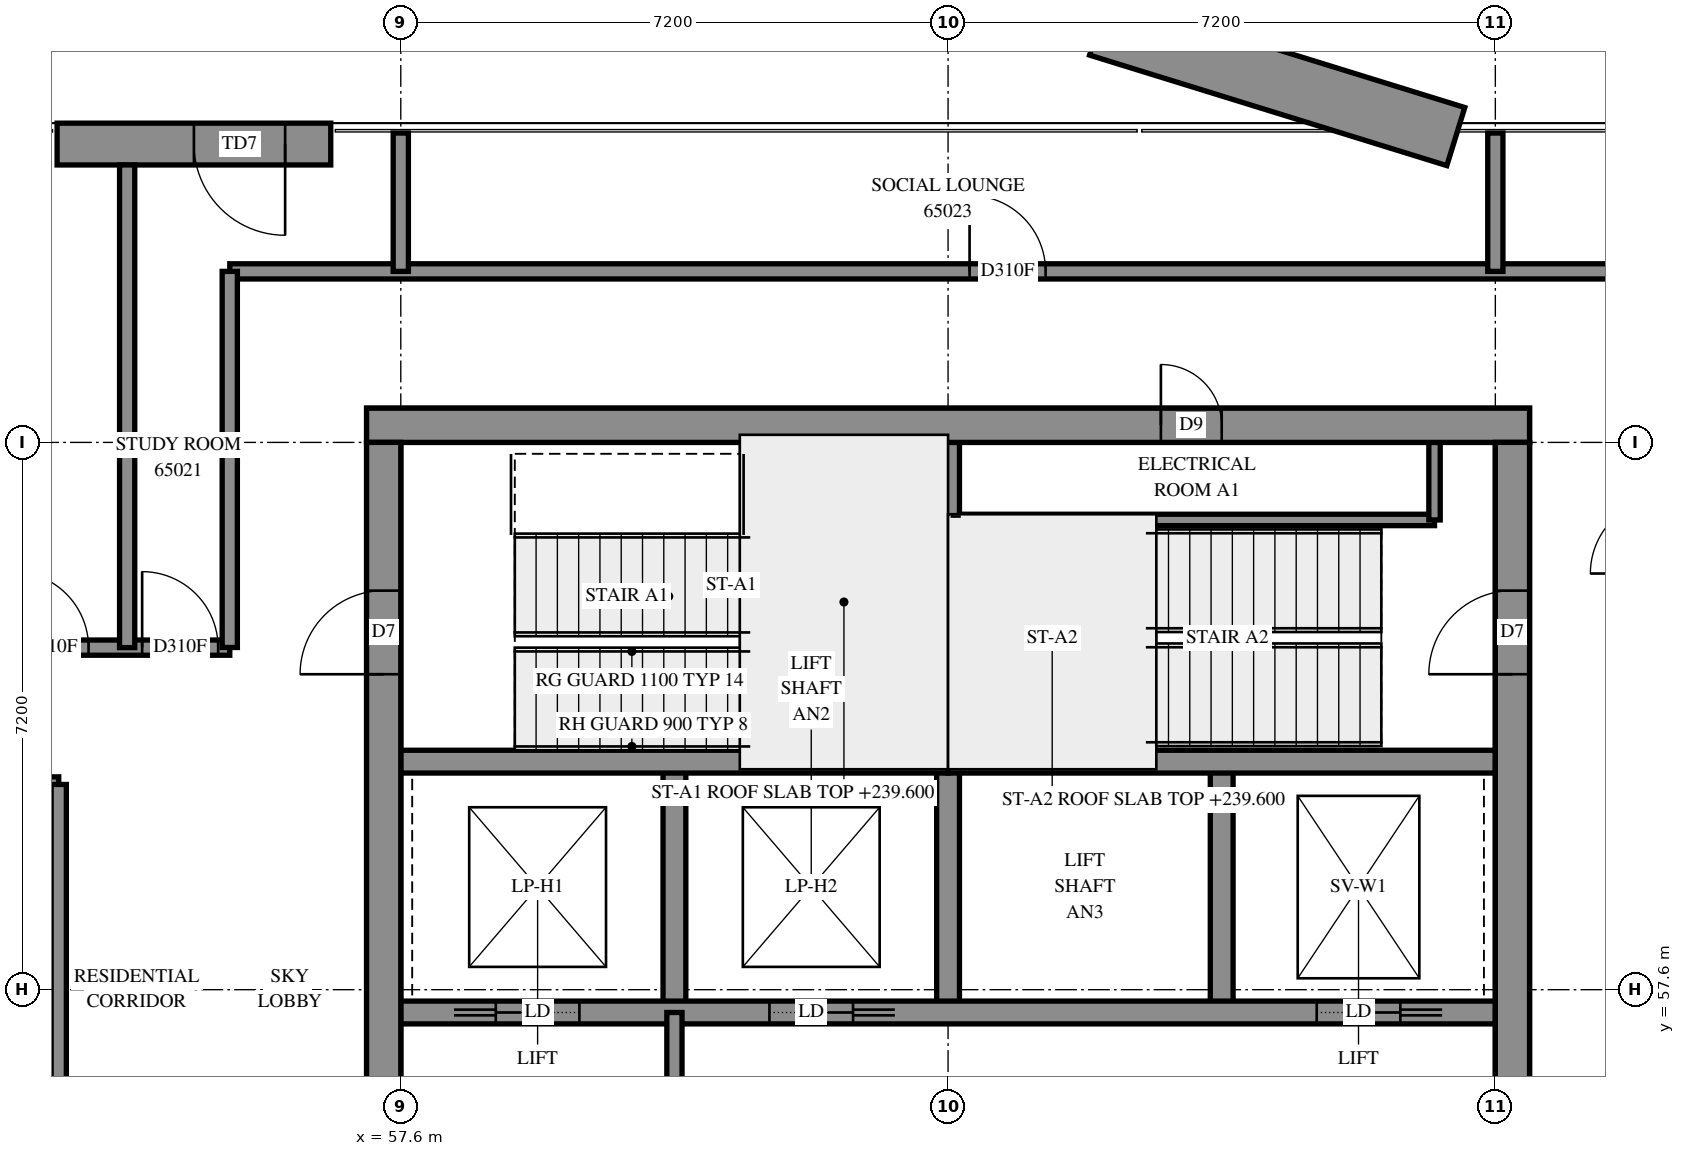
"""IFC4 building model, lengths in metres.
Left out: names, types, materials, properties, quantities, classifications, styles, units other than length and angle.
Written with IfcOpenShell. Run it as: python <this file> out.ifc"""

import sys

from ifc_helpers import new_model, si_unit, direction, frame, frame_2d, origin, place, context, subcontext, project, spatial, rectangle, extrude, element, fill, save


model = new_model("IFC4")
c1 = context("Model", 3, precision=1e-05, world=origin(), true_north=direction((0.0, 1.0)))
c2 = subcontext(c1, "Body", "Model", "MODEL_VIEW")
j1 = project(units=[si_unit("LENGTHUNIT", "METRE"), si_unit("PLANEANGLEUNIT", "RADIAN")], contexts=[c1])
p1 = place(None, origin())
s1 = spatial("IfcSite", under=j1, at=p1, CompositionType="ELEMENT")
p2 = place(p1, origin())
s2 = spatial("IfcBuilding", under=s1, at=p2, CompositionType="ELEMENT")
p3 = place(p2, frame((0.0, 0.0, 239.6)))
s3 = spatial("IfcBuildingStorey", under=s2, at=p3, CompositionType="ELEMENT", Elevation=239.6)
p4 = place(p3, frame((57.15, 65.025, -0.3), z_axis=(0.0, 0.0, 1.0), x_axis=(1.0, 0.0, 0.0)))
e1 = element("IfcWall", 1, at=p4, inside=s3, PredefinedType="SHEAR", context=c2, shape_type="SweptSolid", body=[
    extrude(rectangle(XDim=15.3, YDim=0.45, at=frame_2d((7.65, 0.0))), origin(), (0.0, 0.0, 1.0), 3.5),
])
p5 = place(p4, frame((10.45, 0.0, 0.3)))
e2 = element("IfcOpeningElement", 2, at=p5, cuts=e1, PredefinedType="OPENING", context=c2, shape_type="SweptSolid", body=[
    extrude(rectangle(XDim=0.8, YDim=2.1, at=frame_2d((0.4, 1.05))), frame((0.0, 0.235, 0.0), z_axis=(0.0, -1.0, 0.0), x_axis=(1.0, 0.0, 0.0)), (0.0, 0.0, 1.0), 0.47),
])
p6 = place(p3, frame((57.375, 50.4, -0.3), z_axis=(0.0, 0.0, 1.0), x_axis=(0.0, 1.0, 0.0)))
e3 = element("IfcWall", 3, at=p6, inside=s3, PredefinedType="SHEAR", context=c2, shape_type="SweptSolid", body=[
    extrude(rectangle(XDim=14.4, YDim=0.45, at=frame_2d((7.2, 0.0))), origin(), (0.0, 0.0, 1.0), 3.5),
])
p7 = place(p6, frame((4.55, 0.0, 0.3)))
e4 = element("IfcOpeningElement", 4, at=p7, cuts=e3, PredefinedType="OPENING", context=c2, shape_type="SweptSolid", body=[
    extrude(rectangle(XDim=1.1, YDim=2.1, at=frame_2d((0.55, 1.05))), frame((0.0, 0.235, 0.0), z_axis=(0.0, -1.0, 0.0), x_axis=(1.0, 0.0, 0.0)), (0.0, 0.0, 1.0), 0.47),
])
p8 = place(p6, frame((11.35, 0.0, 0.3)))
e5 = element("IfcOpeningElement", 5, at=p8, cuts=e3, PredefinedType="OPENING", context=c2, shape_type="SweptSolid", body=[
    extrude(rectangle(XDim=1.1, YDim=2.1, at=frame_2d((0.55, 1.05))), frame((0.0, 0.235, 0.0), z_axis=(0.0, -1.0, 0.0), x_axis=(1.0, 0.0, 0.0)), (0.0, 0.0, 1.0), 0.47),
])
p9 = place(p3, frame((72.225, 50.4, -0.3), z_axis=(0.0, 0.0, 1.0), x_axis=(0.0, 1.0, 0.0)))
e6 = element("IfcWall", 6, at=p9, inside=s3, PredefinedType="SHEAR", context=c2, shape_type="SweptSolid", body=[
    extrude(rectangle(XDim=14.4, YDim=0.45, at=frame_2d((7.2, 0.0))), origin(), (0.0, 0.0, 1.0), 3.5),
])
p10 = place(p9, frame((4.55, 0.0, 0.3)))
e7 = element("IfcOpeningElement", 7, at=p10, cuts=e6, PredefinedType="OPENING", context=c2, shape_type="SweptSolid", body=[
    extrude(rectangle(XDim=1.1, YDim=2.1, at=frame_2d((0.55, 1.05))), frame((0.0, 0.235, 0.0), z_axis=(0.0, -1.0, 0.0), x_axis=(1.0, 0.0, 0.0)), (0.0, 0.0, 1.0), 0.47),
])
p11 = place(p9, frame((11.35, 0.0, 0.3)))
e8 = element("IfcOpeningElement", 8, at=p11, cuts=e6, PredefinedType="OPENING", context=c2, shape_type="SweptSolid", body=[
    extrude(rectangle(XDim=1.1, YDim=2.1, at=frame_2d((0.55, 1.05))), frame((0.0, 0.235, 0.0), z_axis=(0.0, -1.0, 0.0), x_axis=(1.0, 0.0, 0.0)), (0.0, 0.0, 1.0), 0.47),
])
for number, where, z_axis, x_axis in (
    (9, (61.2, 57.3, 0.0), (0.0, 0.0, 1.0), (0.0, 1.0, 0.0)),
    (10, (64.8, 57.3, 0.0), (0.0, 0.0, 1.0), (0.0, 1.0, 0.0)),
    (11, (68.4, 57.3, 0.0), (0.0, 0.0, 1.0), (0.0, 1.0, 0.0)),
):
    element("IfcWall", number, at=place(p3, frame(where, z_axis=z_axis, x_axis=x_axis)), inside=s3, PredefinedType="SOLIDWALL", context=c2, shape_type="SweptSolid", body=[
        extrude(rectangle(XDim=3.3, YDim=0.3, at=frame_2d((1.65, 0.0))), origin(), (0.0, 0.0, 1.0), 3.9),
    ])
p12 = place(p3, frame((57.6, 57.3, 0.0), z_axis=(0.0, 0.0, 1.0), x_axis=(1.0, 0.0, 0.0)))
e12 = element("IfcWall", 12, at=p12, inside=s3, PredefinedType="SOLIDWALL", context=c2, shape_type="SweptSolid", body=[
    extrude(rectangle(XDim=14.4, YDim=0.3, at=frame_2d((7.2, 0.0))), origin(), (0.0, 0.0, 1.0), 3.9),
])
p13 = place(p12, frame((1.25, 0.0, 0.0)))
e13 = element("IfcOpeningElement", 13, at=p13, cuts=e12, PredefinedType="OPENING", context=c2, shape_type="SweptSolid", body=[
    extrude(rectangle(XDim=1.1, YDim=2.1, at=frame_2d((0.55, 1.05))), frame((0.0, 0.16, 0.0), z_axis=(0.0, -1.0, 0.0), x_axis=(1.0, 0.0, 0.0)), (0.0, 0.0, 1.0), 0.32),
])
p14 = place(p12, frame((4.85, 0.0, 0.0)))
e14 = element("IfcOpeningElement", 14, at=p14, cuts=e12, PredefinedType="OPENING", context=c2, shape_type="SweptSolid", body=[
    extrude(rectangle(XDim=1.1, YDim=2.1, at=frame_2d((0.55, 1.05))), frame((0.0, 0.16, 0.0), z_axis=(0.0, -1.0, 0.0), x_axis=(1.0, 0.0, 0.0)), (0.0, 0.0, 1.0), 0.32),
])
p15 = place(p12, frame((12.05, 0.0, 0.0)))
e15 = element("IfcOpeningElement", 15, at=p15, cuts=e12, PredefinedType="OPENING", context=c2, shape_type="SweptSolid", body=[
    extrude(rectangle(XDim=1.1, YDim=2.1, at=frame_2d((0.55, 1.05))), frame((0.0, 0.16, 0.0), z_axis=(0.0, -1.0, 0.0), x_axis=(1.0, 0.0, 0.0)), (0.0, 0.0, 1.0), 0.32),
])
for number, where, z_axis, x_axis in (
    (16, (57.6, 60.6, 0.0), (0.0, 0.0, 1.0), (1.0, 0.0, 0.0)),
    (17, (64.8, 60.6, 0.0), (0.0, 0.0, 1.0), (1.0, 0.0, 0.0)),
):
    element("IfcWall", number, at=place(p3, frame(where, z_axis=z_axis, x_axis=x_axis)), inside=s3, PredefinedType="SOLIDWALL", context=c2, shape_type="SweptSolid", body=[
        extrude(rectangle(XDim=7.2, YDim=0.3, at=frame_2d((3.6, 0.0))), origin(), (0.0, 0.0, 1.0), 3.9),
    ])
p16 = place(p3, frame((64.8, 60.6, 0.0), z_axis=(0.0, 0.0, 1.0), x_axis=(0.0, 1.0, 0.0)))
e18 = element("IfcWall", 18, at=p16, inside=s3, PredefinedType="SOLIDWALL", context=c2, shape_type="SweptSolid", body=[
    extrude(rectangle(XDim=4.2, YDim=0.3, at=frame_2d((2.1, 0.0))), origin(), (0.0, 0.0, 1.0), 3.9),
])
p17 = place(p3, frame((56.678, 68.725, 0.0), z_axis=(0.0, 0.0, 1.0), x_axis=(-1.0, 0.0, 0.0)))
e19 = element("IfcWall", 19, at=p17, inside=s3, PredefinedType="SOLIDWALL", context=c2, shape_type="SweptSolid", body=[
    extrude(rectangle(XDim=3.6, YDim=0.55, at=frame_2d((1.8, 0.0))), origin(), (0.0, 0.0, 1.0), 3.9),
])
p18 = place(p17, frame((0.6, 0.0, 0.0)))
e20 = element("IfcOpeningElement", 20, at=p18, cuts=e19, PredefinedType="OPENING", context=c2, shape_type="SweptSolid", body=[
    extrude(rectangle(XDim=1.2, YDim=2.4, at=frame_2d((0.6, 1.2))), frame((0.0, 0.285, 0.0), z_axis=(0.0, -1.0, 0.0), x_axis=(1.0, 0.0, 0.0)), (0.0, 0.0, 1.0), 0.57),
])
p19 = place(p3, frame((71.48, 68.824, 0.0), z_axis=(0.0, 0.0, 1.0), x_axis=(-0.9553587294, 0.2954483004, 0.0)))
e21 = element("IfcWall", 21, at=p19, inside=s3, PredefinedType="SOLIDWALL", context=c2, shape_type="SweptSolid", body=[
    extrude(rectangle(XDim=4.919, YDim=0.8, at=frame_2d((2.46, 0.0))), origin(), (0.0, 0.0, 1.0), 0.65),
])
p20 = place(p3, frame((64.95, 63.78, 0.0), z_axis=(0.0, 0.0, 1.0), x_axis=(1.0, 0.0, 0.0)))
e22 = element("IfcWall", 22, at=p20, inside=s3, PredefinedType="PARTITIONING", context=c2, shape_type="SweptSolid", body=[
    extrude(rectangle(XDim=6.25, YDim=0.15, at=frame_2d((3.125, 0.0))), origin(), (0.0, 0.0, 1.0), 3.9),
])
p21 = place(p3, frame((71.2, 63.78, 0.0), z_axis=(0.0, 0.0, 1.0), x_axis=(0.0, 1.0, 0.0)))
e23 = element("IfcWall", 23, at=p21, inside=s3, PredefinedType="PARTITIONING", context=c2, shape_type="SweptSolid", body=[
    extrude(rectangle(XDim=1.02, YDim=0.15, at=frame_2d((0.51, 0.0))), origin(), (0.0, 0.0, 1.0), 3.9),
])
p22 = place(p3, frame((61.2, 53.7, 0.0), z_axis=(0.0, 0.0, 1.0), x_axis=(0.0, 1.0, 0.0)))
e24 = element("IfcWall", 24, at=p22, inside=s3, PredefinedType="PARTITIONING", context=c2, shape_type="SweptSolid", body=[
    extrude(rectangle(XDim=3.6, YDim=0.2, at=frame_2d((1.8, 0.0))), origin(), (0.0, 0.0, 1.0), 3.9),
])
p23 = place(p3, frame((55.35, 67.05, 0.0), z_axis=(0.0, 0.0, 1.0), x_axis=(1.0, 0.0, 0.0)))
e25 = element("IfcWall", 25, at=p23, inside=s3, PredefinedType="PARTITIONING", context=c2, shape_type="SweptSolid", body=[
    extrude(rectangle(XDim=18.9, YDim=0.2, at=frame_2d((9.45, 0.0))), origin(), (0.0, 0.0, 1.0), 3.9),
])
p24 = place(p23, frame((9.733, 0.0, 0.0)))
e26 = element("IfcOpeningElement", 26, at=p24, cuts=e25, PredefinedType="OPENING", context=c2, shape_type="SweptSolid", body=[
    extrude(rectangle(XDim=1.0, YDim=2.1, at=frame_2d((0.5, 1.05))), frame((0.0, 0.11, 0.0), z_axis=(0.0, -1.0, 0.0), x_axis=(1.0, 0.0, 0.0)), (0.0, 0.0, 1.0), 0.22),
])
p25 = place(p3, frame((40.502, 62.1, 0.0), z_axis=(0.0, 0.0, 1.0), x_axis=(1.0, 0.0, 0.0)))
e27 = element("IfcWall", 27, at=p25, inside=s3, PredefinedType="PARTITIONING", context=c2, shape_type="SweptSolid", body=[
    extrude(rectangle(XDim=14.848, YDim=0.2, at=frame_2d((7.424, 0.0))), origin(), (0.0, 0.0, 1.0), 3.9),
])
p26 = place(p25, frame((6.561, 0.0, 0.0)))
e28 = element("IfcOpeningElement", 28, at=p26, cuts=e27, PredefinedType="OPENING", context=c2, shape_type="SweptSolid", body=[
    extrude(rectangle(XDim=1.0, YDim=2.1, at=frame_2d((0.5, 1.05))), frame((0.0, 0.11, 0.0), z_axis=(0.0, -1.0, 0.0), x_axis=(1.0, 0.0, 0.0)), (0.0, 0.0, 1.0), 0.22),
])
p27 = place(p25, frame((11.991, 0.0, 0.0)))
e29 = element("IfcOpeningElement", 29, at=p27, cuts=e27, PredefinedType="OPENING", context=c2, shape_type="SweptSolid", body=[
    extrude(rectangle(XDim=1.0, YDim=2.1, at=frame_2d((0.5, 1.05))), frame((0.0, 0.11, 0.0), z_axis=(0.0, -1.0, 0.0), x_axis=(1.0, 0.0, 0.0)), (0.0, 0.0, 1.0), 0.22),
])
p28 = place(p25, frame((13.695, 0.0, 0.0)))
e30 = element("IfcOpeningElement", 30, at=p28, cuts=e27, PredefinedType="OPENING", context=c2, shape_type="SweptSolid", body=[
    extrude(rectangle(XDim=1.0, YDim=2.1, at=frame_2d((0.5, 1.05))), frame((0.0, 0.11, 0.0), z_axis=(0.0, -1.0, 0.0), x_axis=(1.0, 0.0, 0.0)), (0.0, 0.0, 1.0), 0.22),
])
p29 = place(p3, frame((46.33, 60.3, 0.0), z_axis=(0.0, 0.0, 1.0), x_axis=(1.0, 0.0, 0.0)))
e31 = element("IfcWall", 31, at=p29, inside=s3, PredefinedType="PARTITIONING", context=c2, shape_type="SweptSolid", body=[
    extrude(rectangle(XDim=6.77, YDim=0.2, at=frame_2d((3.385, 0.0))), origin(), (0.0, 0.0, 1.0), 3.9),
])
p30 = place(p29, frame((0.924, 0.0, 0.0)))
e32 = element("IfcOpeningElement", 32, at=p30, cuts=e31, PredefinedType="OPENING", context=c2, shape_type="SweptSolid", body=[
    extrude(rectangle(XDim=1.0, YDim=2.1, at=frame_2d((0.5, 1.05))), frame((0.0, 0.11, 0.0), z_axis=(0.0, -1.0, 0.0), x_axis=(1.0, 0.0, 0.0)), (0.0, 0.0, 1.0), 0.22),
])
p31 = place(p29, frame((5.633, 0.0, 0.0)))
e33 = element("IfcOpeningElement", 33, at=p31, cuts=e31, PredefinedType="OPENING", context=c2, shape_type="SweptSolid", body=[
    extrude(rectangle(XDim=1.0, YDim=2.1, at=frame_2d((0.5, 1.05))), frame((0.0, 0.11, 0.0), z_axis=(0.0, -1.0, 0.0), x_axis=(1.0, 0.0, 0.0)), (0.0, 0.0, 1.0), 0.22),
])
p32 = place(p3, frame((54.0, 62.1, 0.0), z_axis=(0.0, 0.0, 1.0), x_axis=(0.0, 1.0, 0.0)))
e34 = element("IfcWall", 34, at=p32, inside=s3, PredefinedType="PARTITIONING", context=c2, shape_type="SweptSolid", body=[
    extrude(rectangle(XDim=6.35, YDim=0.2, at=frame_2d((3.175, 0.0))), origin(), (0.0, 0.0, 1.0), 3.9),
])
p33 = place(p3, frame((53.1, 54.902, 0.0), z_axis=(0.0, 0.0, 1.0), x_axis=(0.0, 1.0, 0.0)))
e35 = element("IfcWall", 35, at=p33, inside=s3, PredefinedType="PARTITIONING", context=c2, shape_type="SweptSolid", body=[
    extrude(rectangle(XDim=5.398, YDim=0.2, at=frame_2d((2.699, 0.0))), origin(), (0.0, 0.0, 1.0), 3.9),
])
p34 = place(p3, frame((55.35, 62.102, 0.0), z_axis=(0.0, 0.0, 1.0), x_axis=(0.0, 1.0, 0.0)))
e36 = element("IfcWall", 36, at=p34, inside=s3, PredefinedType="PARTITIONING", context=c2, shape_type="SweptSolid", body=[
    extrude(rectangle(XDim=4.948, YDim=0.2, at=frame_2d((2.474, 0.0))), origin(), (0.0, 0.0, 1.0), 3.9),
])
for number, where, z_axis, x_axis in (
    (37, (57.6, 67.05, 0.0), (0.0, 0.0, 1.0), (0.0, 1.0, 0.0)),
    (38, (72.0, 67.05, 0.0), (0.0, 0.0, 1.0), (0.0, 1.0, 0.0)),
):
    element("IfcWall", number, at=place(p3, frame(where, z_axis=z_axis, x_axis=x_axis)), inside=s3, PredefinedType="PARTITIONING", context=c2, shape_type="SweptSolid", body=[
        extrude(rectangle(XDim=1.82, YDim=0.2, at=frame_2d((0.91, 0.0))), origin(), (0.0, 0.0, 1.0), 3.9),
    ])
p35 = place(p18, origin())
e39 = element("IfcDoor", 39, at=p35, inside=s3, OperationType="SINGLE_SWING_LEFT", PredefinedType="DOOR", context=c2, shape_type="SweptSolid", body=[
    extrude(rectangle(XDim=1.2, YDim=2.4, at=frame_2d((0.6, 1.2))), frame((0.0, 0.025, 0.0), z_axis=(0.0, -1.0, 0.0), x_axis=(1.0, 0.0, 0.0)), (0.0, 0.0, 1.0), 0.05),
])
fill(e20, e39)
p36 = place(p5, origin())
e40 = element("IfcDoor", 40, at=p36, inside=s3, OperationType="SINGLE_SWING_RIGHT", PredefinedType="DOOR", context=c2, shape_type="SweptSolid", body=[
    extrude(rectangle(XDim=0.8, YDim=2.1, at=frame_2d((0.4, 1.05))), frame((0.0, 0.025, 0.0), z_axis=(0.0, -1.0, 0.0), x_axis=(1.0, 0.0, 0.0)), (0.0, 0.0, 1.0), 0.05),
])
fill(e2, e40)
p37 = place(p8, origin())
e41 = element("IfcDoor", 41, at=p37, inside=s3, OperationType="SINGLE_SWING_LEFT", PredefinedType="DOOR", context=c2, shape_type="SweptSolid", body=[
    extrude(rectangle(XDim=1.1, YDim=2.1, at=frame_2d((0.55, 1.05))), frame((0.0, 0.025, 0.0), z_axis=(0.0, -1.0, 0.0), x_axis=(1.0, 0.0, 0.0)), (0.0, 0.0, 1.0), 0.05),
])
fill(e5, e41)
p38 = place(p11, origin())
e42 = element("IfcDoor", 42, at=p38, inside=s3, OperationType="SINGLE_SWING_RIGHT", PredefinedType="DOOR", context=c2, shape_type="SweptSolid", body=[
    extrude(rectangle(XDim=1.1, YDim=2.1, at=frame_2d((0.55, 1.05))), frame((0.0, 0.025, 0.0), z_axis=(0.0, -1.0, 0.0), x_axis=(1.0, 0.0, 0.0)), (0.0, 0.0, 1.0), 0.05),
])
fill(e8, e42)
p39 = place(p13, origin())
e43 = element("IfcDoor", 43, at=p39, inside=s3, OperationType="SLIDING_TO_LEFT", PredefinedType="DOOR", context=c2, shape_type="SweptSolid", body=[
    extrude(rectangle(XDim=1.1, YDim=2.1, at=frame_2d((0.55, 1.05))), frame((0.0, 0.025, 0.0), z_axis=(0.0, -1.0, 0.0), x_axis=(1.0, 0.0, 0.0)), (0.0, 0.0, 1.0), 0.05),
])
fill(e13, e43)
p40 = place(p14, origin())
e44 = element("IfcDoor", 44, at=p40, inside=s3, OperationType="SLIDING_TO_RIGHT", PredefinedType="DOOR", context=c2, shape_type="SweptSolid", body=[
    extrude(rectangle(XDim=1.1, YDim=2.1, at=frame_2d((0.55, 1.05))), frame((0.0, 0.025, 0.0), z_axis=(0.0, -1.0, 0.0), x_axis=(1.0, 0.0, 0.0)), (0.0, 0.0, 1.0), 0.05),
])
fill(e14, e44)
p41 = place(p15, origin())
e45 = element("IfcDoor", 45, at=p41, inside=s3, OperationType="SLIDING_TO_RIGHT", PredefinedType="DOOR", context=c2, shape_type="SweptSolid", body=[
    extrude(rectangle(XDim=1.1, YDim=2.1, at=frame_2d((0.55, 1.05))), frame((0.0, 0.025, 0.0), z_axis=(0.0, -1.0, 0.0), x_axis=(1.0, 0.0, 0.0)), (0.0, 0.0, 1.0), 0.05),
])
fill(e15, e45)
p42 = place(p27, origin())
e46 = element("IfcDoor", 46, at=p42, inside=s3, OperationType="SINGLE_SWING_RIGHT", PredefinedType="DOOR", context=c2, shape_type="SweptSolid", body=[
    extrude(rectangle(XDim=1.0, YDim=2.1, at=frame_2d((0.5, 1.05))), frame((0.0, 0.025, 0.0), z_axis=(0.0, -1.0, 0.0), x_axis=(1.0, 0.0, 0.0)), (0.0, 0.0, 1.0), 0.05),
])
fill(e29, e46)
p43 = place(p28, origin())
e47 = element("IfcDoor", 47, at=p43, inside=s3, OperationType="SINGLE_SWING_LEFT", PredefinedType="DOOR", context=c2, shape_type="SweptSolid", body=[
    extrude(rectangle(XDim=1.0, YDim=2.1, at=frame_2d((0.5, 1.05))), frame((0.0, 0.025, 0.0), z_axis=(0.0, -1.0, 0.0), x_axis=(1.0, 0.0, 0.0)), (0.0, 0.0, 1.0), 0.05),
])
fill(e30, e47)
p44 = place(p24, origin())
e48 = element("IfcDoor", 48, at=p44, inside=s3, OperationType="SINGLE_SWING_RIGHT", PredefinedType="DOOR", context=c2, shape_type="SweptSolid", body=[
    extrude(rectangle(XDim=1.0, YDim=2.1, at=frame_2d((0.5, 1.05))), frame((0.0, 0.025, 0.0), z_axis=(0.0, -1.0, 0.0), x_axis=(1.0, 0.0, 0.0)), (0.0, 0.0, 1.0), 0.05),
])
fill(e26, e48)
save(model, sys.argv[1])
